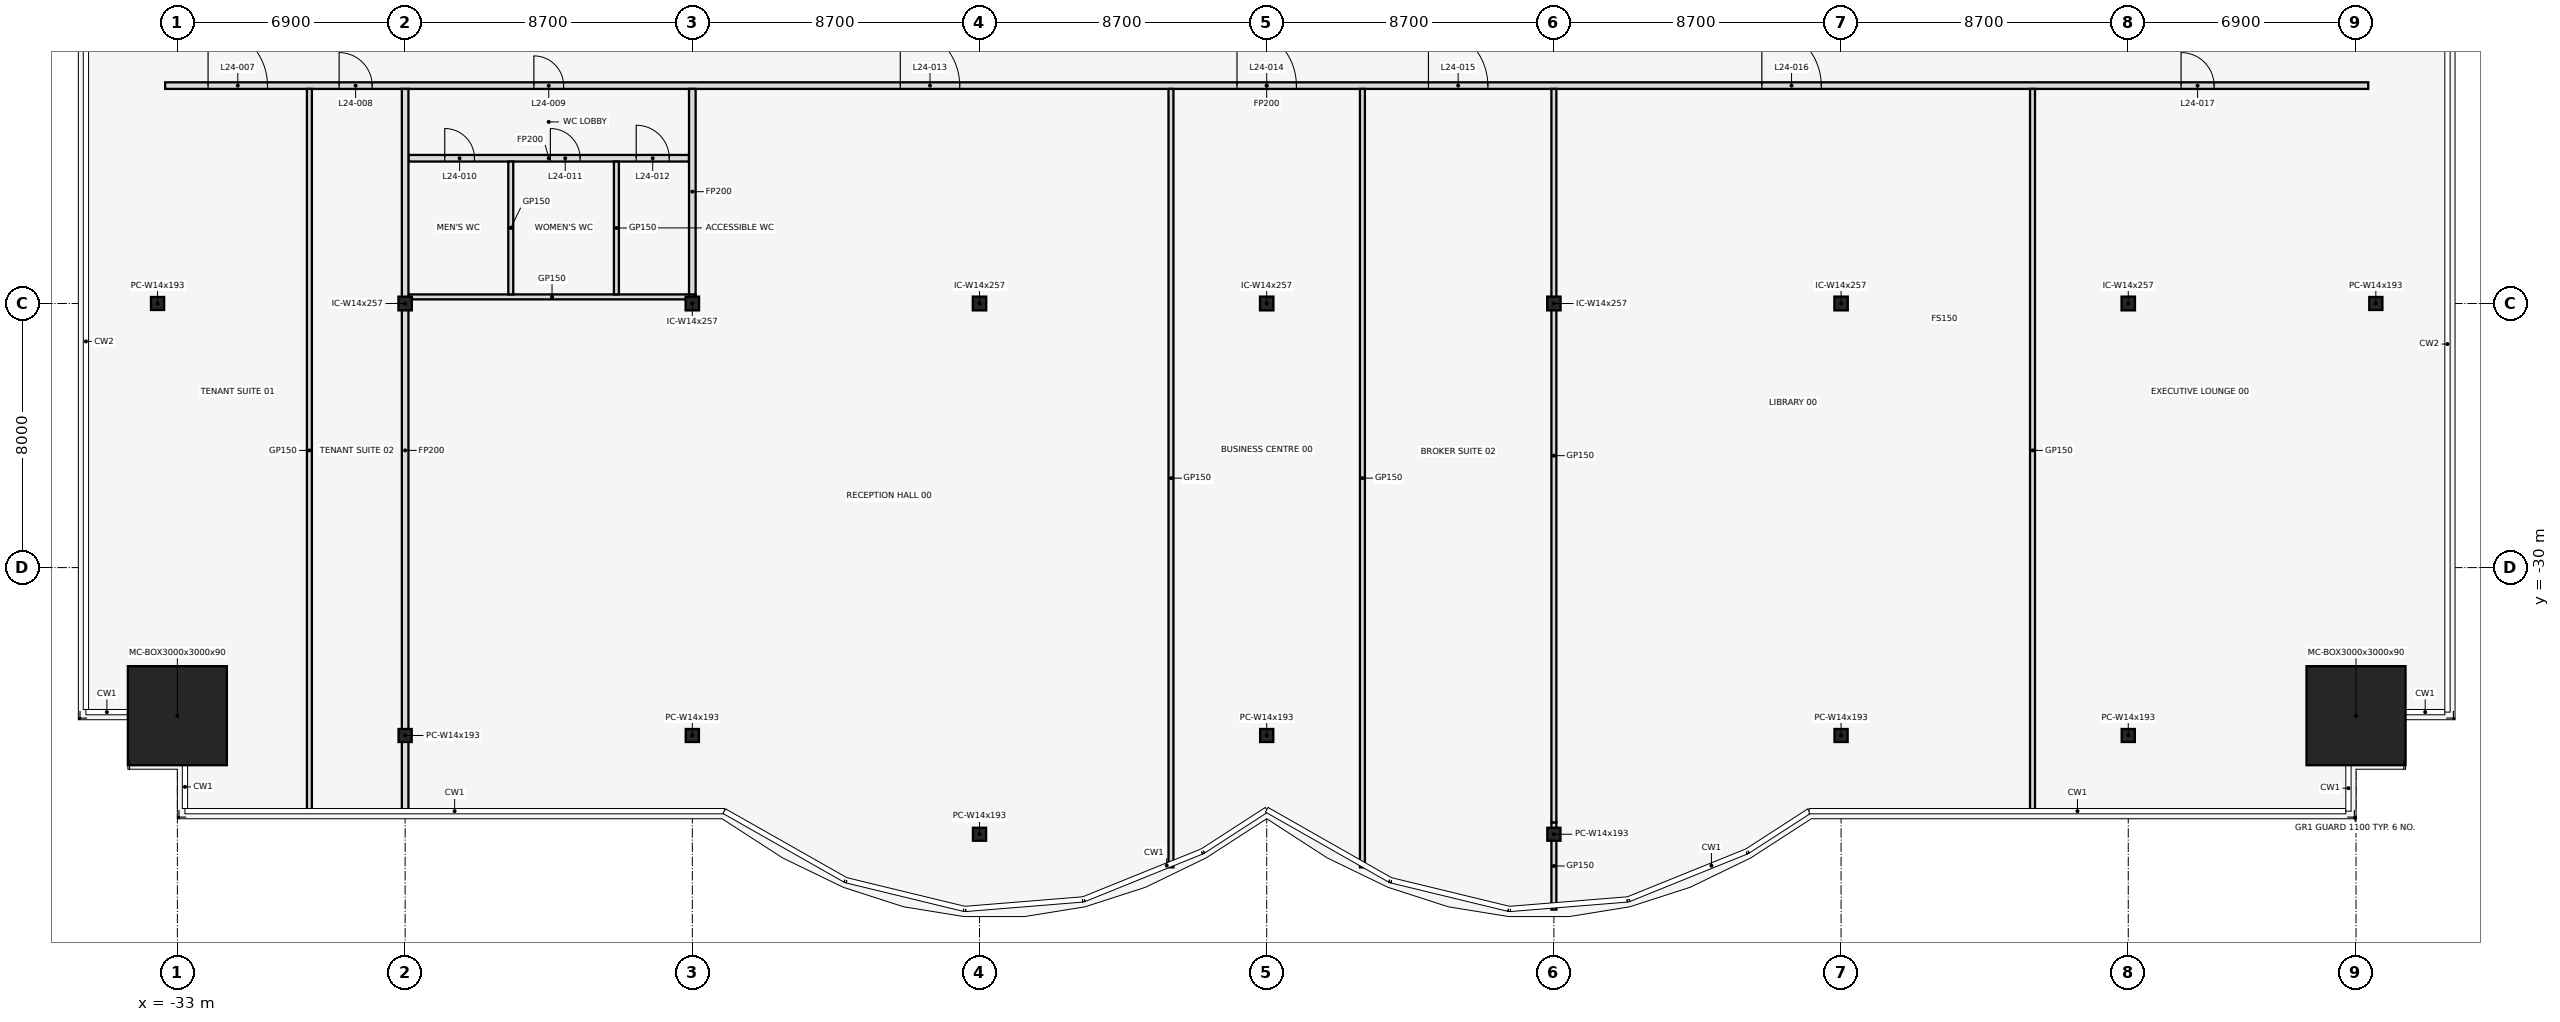
"""IFC4 building model, lengths in metres.
Left out: names, types, materials, properties, quantities, classifications, styles, units other than length and angle.
Written with IfcOpenShell. Run it as: python <this file> out.ifc"""

import sys

from ifc_helpers import new_model, si_unit, direction, frame, frame_2d, origin, origin_2d, place, context, subcontext, project, spatial, rectangle, hollow_rectangle, i_section, extrude, element, fill, save


model = new_model("IFC4")
c1 = context("Model", 3, precision=1e-05, world=origin(), true_north=direction((0.0, 1.0)))
c2 = subcontext(c1, "Body", "Model", "MODEL_VIEW")
j1 = project(units=[si_unit("LENGTHUNIT", "METRE"), si_unit("PLANEANGLEUNIT", "RADIAN")], contexts=[c1])
p1 = place(None, origin())
s1 = spatial("IfcSite", under=j1, at=p1, CompositionType="ELEMENT")
p2 = place(p1, origin())
s2 = spatial("IfcBuilding", under=s1, at=p2, CompositionType="ELEMENT")
p3 = place(p2, frame((0.0, 0.0, 114.5)))
s3 = spatial("IfcBuildingStorey", under=s2, at=p3, CompositionType="ELEMENT", Elevation=114.5)
p4 = place(p3, frame((-33.0, -34.486, 0.0), z_axis=(0.0, 0.0, 1.0), x_axis=(1.0, 0.0, 0.0)))
e1 = element("IfcColumn", 1, at=p4, inside=s3, PredefinedType="COLUMN", context=c2, shape_type="SweptSolid", body=[
    extrude(hollow_rectangle(XDim=3.0, YDim=3.0, WallThickness=0.09, at=origin_2d()), origin(), (0.0, 0.0, 1.0), 4.1),
])
for number, where, z_axis, x_axis in (
    (2, (-26.1, -35.086, 0.0), (0.0, 0.0, 1.0), (1.0, 0.0, 0.0)),
    (3, (-17.4, -35.086, 0.0), (0.0, 0.0, 1.0), (1.0, 0.0, 0.0)),
    (4, (-8.7, -38.077, 0.0), (0.0, 0.0, 1.0), (1.0, 0.0, 0.0)),
    (5, (0.0, -35.086, 0.0), (0.0, 0.0, 1.0), (1.0, 0.0, 0.0)),
    (6, (8.7, -38.077, 0.0), (0.0, 0.0, 1.0), (1.0, 0.0, 0.0)),
    (7, (17.4, -35.086, 0.0), (0.0, 0.0, 1.0), (1.0, 0.0, 0.0)),
    (8, (26.1, -35.086, 0.0), (0.0, 0.0, 1.0), (1.0, 0.0, 0.0)),
):
    element("IfcColumn", number, at=place(p3, frame(where, z_axis=z_axis, x_axis=x_axis)), inside=s3, PredefinedType="COLUMN", context=c2, shape_type="SweptSolid", body=[
        extrude(i_section(OverallWidth=0.399, OverallDepth=0.394, WebThickness=0.023, FlangeThickness=0.037, at=origin_2d()), origin(), (0.0, 0.0, 1.0), 4.1),
    ])
p5 = place(p3, frame((33.0, -34.486, 0.0), z_axis=(0.0, 0.0, 1.0), x_axis=(1.0, 0.0, 0.0)))
e9 = element("IfcColumn", 9, at=p5, inside=s3, PredefinedType="COLUMN", context=c2, shape_type="SweptSolid", body=[
    extrude(hollow_rectangle(XDim=3.0, YDim=3.0, WallThickness=0.09, at=origin_2d()), origin(), (0.0, 0.0, 1.0), 4.1),
])
for number, where, z_axis, x_axis in (
    (10, (-33.6, -22.0, 0.0), (0.0, 0.0, 1.0), (1.0, 0.0, 0.0)),
    (11, (33.6, -22.0, 0.0), (0.0, 0.0, 1.0), (1.0, 0.0, 0.0)),
):
    element("IfcColumn", number, at=place(p3, frame(where, z_axis=z_axis, x_axis=x_axis)), inside=s3, PredefinedType="COLUMN", context=c2, shape_type="SweptSolid", body=[
        extrude(i_section(OverallWidth=0.399, OverallDepth=0.394, WebThickness=0.023, FlangeThickness=0.037, at=origin_2d()), origin(), (0.0, 0.0, 1.0), 4.1),
    ])
for number, where, z_axis, x_axis in (
    (12, (-26.1, -22.0, 0.0), (0.0, 0.0, 1.0), (1.0, 0.0, 0.0)),
    (13, (-17.4, -22.0, 0.0), (0.0, 0.0, 1.0), (1.0, 0.0, 0.0)),
    (14, (-8.7, -22.0, 0.0), (0.0, 0.0, 1.0), (1.0, 0.0, 0.0)),
    (15, (0.0, -22.0, 0.0), (0.0, 0.0, 1.0), (1.0, 0.0, 0.0)),
    (16, (8.7, -22.0, 0.0), (0.0, 0.0, 1.0), (1.0, 0.0, 0.0)),
    (17, (17.4, -22.0, 0.0), (0.0, 0.0, 1.0), (1.0, 0.0, 0.0)),
    (18, (26.1, -22.0, 0.0), (0.0, 0.0, 1.0), (1.0, 0.0, 0.0)),
):
    element("IfcColumn", number, at=place(p3, frame(where, z_axis=z_axis, x_axis=x_axis)), inside=s3, PredefinedType="COLUMN", context=c2, shape_type="SweptSolid", body=[
        extrude(i_section(OverallWidth=0.406, OverallDepth=0.417, WebThickness=0.03, FlangeThickness=0.048, at=origin_2d()), origin(), (0.0, 0.0, 1.0), 4.1),
    ])
p6 = place(p3, frame((-26.0, -21.8, 0.0), z_axis=(0.0, 0.0, 1.0), x_axis=(1.0, 0.0, 0.0)))
e19 = element("IfcWall", 19, at=p6, inside=s3, PredefinedType="PARTITIONING", context=c2, shape_type="SweptSolid", body=[
    extrude(rectangle(XDim=8.7, YDim=0.15, at=frame_2d((4.35, 0.0))), origin(), (0.0, 0.0, 1.0), 3.018),
])
p7 = place(p3, frame((-26.0, -17.6, 0.0), z_axis=(0.0, 0.0, 1.0), x_axis=(1.0, 0.0, 0.0)))
e20 = element("IfcWall", 20, at=p7, inside=s3, PredefinedType="PARTITIONING", context=c2, shape_type="SweptSolid", body=[
    extrude(rectangle(XDim=8.5, YDim=0.2, at=frame_2d((4.25, 0.0))), origin(), (0.0, 0.0, 1.0), 3.018),
])
p8 = place(p7, frame((1.1, 0.0, 0.0)))
e21 = element("IfcOpeningElement", 21, at=p8, cuts=e20, PredefinedType="OPENING", context=c2, shape_type="SweptSolid", body=[
    extrude(rectangle(XDim=0.9, YDim=2.1, at=frame_2d((0.45, 1.05))), frame((0.0, 0.112, 0.0), z_axis=(0.0, -1.0, 0.0), x_axis=(1.0, 0.0, 0.0)), (0.0, 0.0, 1.0), 0.224),
])
p9 = place(p7, frame((4.3, 0.0, 0.0)))
e22 = element("IfcOpeningElement", 22, at=p9, cuts=e20, PredefinedType="OPENING", context=c2, shape_type="SweptSolid", body=[
    extrude(rectangle(XDim=0.9, YDim=2.1, at=frame_2d((0.45, 1.05))), frame((0.0, 0.112, 0.0), z_axis=(0.0, -1.0, 0.0), x_axis=(1.0, 0.0, 0.0)), (0.0, 0.0, 1.0), 0.224),
])
p10 = place(p7, frame((6.9, 0.0, 0.0)))
e23 = element("IfcOpeningElement", 23, at=p10, cuts=e20, PredefinedType="OPENING", context=c2, shape_type="SweptSolid", body=[
    extrude(rectangle(XDim=1.0, YDim=2.1, at=frame_2d((0.5, 1.05))), frame((0.0, 0.112, 0.0), z_axis=(0.0, -1.0, 0.0), x_axis=(1.0, 0.0, 0.0)), (0.0, 0.0, 1.0), 0.224),
])
p11 = place(p3, frame((-33.37, -15.4, 0.0), z_axis=(0.0, 0.0, 1.0), x_axis=(1.0, 0.0, 0.0)))
e24 = element("IfcWall", 24, at=p11, inside=s3, PredefinedType="PARTITIONING", context=c2, shape_type="SweptSolid", body=[
    extrude(rectangle(XDim=66.74, YDim=0.2, at=frame_2d((33.37, 0.0))), origin(), (0.0, 0.0, 1.0), 3.018),
])
p12 = place(p11, frame((1.3, 0.0, 0.0)))
e25 = element("IfcOpeningElement", 25, at=p12, cuts=e24, PredefinedType="OPENING", context=c2, shape_type="SweptSolid", body=[
    extrude(rectangle(XDim=1.8, YDim=2.1, at=frame_2d((0.9, 1.05))), frame((0.0, 0.112, 0.0), z_axis=(0.0, -1.0, 0.0), x_axis=(1.0, 0.0, 0.0)), (0.0, 0.0, 1.0), 0.224),
])
p13 = place(p11, frame((5.27, 0.0, 0.0)))
e26 = element("IfcOpeningElement", 26, at=p13, cuts=e24, PredefinedType="OPENING", context=c2, shape_type="SweptSolid", body=[
    extrude(rectangle(XDim=1.0, YDim=2.1, at=frame_2d((0.5, 1.05))), frame((0.0, 0.112, 0.0), z_axis=(0.0, -1.0, 0.0), x_axis=(1.0, 0.0, 0.0)), (0.0, 0.0, 1.0), 0.224),
])
p14 = place(p11, frame((11.17, 0.0, 0.0)))
e27 = element("IfcOpeningElement", 27, at=p14, cuts=e24, PredefinedType="OPENING", context=c2, shape_type="SweptSolid", body=[
    extrude(rectangle(XDim=0.9, YDim=2.1, at=frame_2d((0.45, 1.05))), frame((0.0, 0.112, 0.0), z_axis=(0.0, -1.0, 0.0), x_axis=(1.0, 0.0, 0.0)), (0.0, 0.0, 1.0), 0.224),
])
p15 = place(p11, frame((22.27, 0.0, 0.0)))
e28 = element("IfcOpeningElement", 28, at=p15, cuts=e24, PredefinedType="OPENING", context=c2, shape_type="SweptSolid", body=[
    extrude(rectangle(XDim=1.8, YDim=2.1, at=frame_2d((0.9, 1.05))), frame((0.0, 0.112, 0.0), z_axis=(0.0, -1.0, 0.0), x_axis=(1.0, 0.0, 0.0)), (0.0, 0.0, 1.0), 0.224),
])
p16 = place(p11, frame((32.47, 0.0, 0.0)))
e29 = element("IfcOpeningElement", 29, at=p16, cuts=e24, PredefinedType="OPENING", context=c2, shape_type="SweptSolid", body=[
    extrude(rectangle(XDim=1.8, YDim=2.1, at=frame_2d((0.9, 1.05))), frame((0.0, 0.112, 0.0), z_axis=(0.0, -1.0, 0.0), x_axis=(1.0, 0.0, 0.0)), (0.0, 0.0, 1.0), 0.224),
])
p17 = place(p11, frame((38.27, 0.0, 0.0)))
e30 = element("IfcOpeningElement", 30, at=p17, cuts=e24, PredefinedType="OPENING", context=c2, shape_type="SweptSolid", body=[
    extrude(rectangle(XDim=1.8, YDim=2.1, at=frame_2d((0.9, 1.05))), frame((0.0, 0.112, 0.0), z_axis=(0.0, -1.0, 0.0), x_axis=(1.0, 0.0, 0.0)), (0.0, 0.0, 1.0), 0.224),
])
p18 = place(p11, frame((48.37, 0.0, 0.0)))
e31 = element("IfcOpeningElement", 31, at=p18, cuts=e24, PredefinedType="OPENING", context=c2, shape_type="SweptSolid", body=[
    extrude(rectangle(XDim=1.8, YDim=2.1, at=frame_2d((0.9, 1.05))), frame((0.0, 0.112, 0.0), z_axis=(0.0, -1.0, 0.0), x_axis=(1.0, 0.0, 0.0)), (0.0, 0.0, 1.0), 0.224),
])
p19 = place(p11, frame((61.07, 0.0, 0.0)))
e32 = element("IfcOpeningElement", 32, at=p19, cuts=e24, PredefinedType="OPENING", context=c2, shape_type="SweptSolid", body=[
    extrude(rectangle(XDim=1.0, YDim=2.1, at=frame_2d((0.5, 1.05))), frame((0.0, 0.112, 0.0), z_axis=(0.0, -1.0, 0.0), x_axis=(1.0, 0.0, 0.0)), (0.0, 0.0, 1.0), 0.224),
])
p20 = place(p3, frame((-29.0, -37.4, 0.0), z_axis=(0.0, 0.0, 1.0), x_axis=(0.0, 1.0, 0.0)))
e33 = element("IfcWall", 33, at=p20, inside=s3, PredefinedType="PARTITIONING", context=c2, shape_type="SweptSolid", body=[
    extrude(rectangle(XDim=21.9, YDim=0.15, at=frame_2d((10.95, 0.0))), origin(), (0.0, 0.0, 1.0), 3.018),
])
p21 = place(p3, frame((-26.1, -37.4, 0.0), z_axis=(0.0, 0.0, 1.0), x_axis=(0.0, 1.0, 0.0)))
e34 = element("IfcWall", 34, at=p21, inside=s3, PredefinedType="PARTITIONING", context=c2, shape_type="SweptSolid", body=[
    extrude(rectangle(XDim=21.9, YDim=0.2, at=frame_2d((10.95, 0.0))), origin(), (0.0, 0.0, 1.0), 3.018),
])
for number, where, z_axis, x_axis in (
    (35, (-22.9, -21.725, 0.0), (0.0, 0.0, 1.0), (0.0, 1.0, 0.0)),
    (36, (-19.7, -21.725, 0.0), (0.0, 0.0, 1.0), (0.0, 1.0, 0.0)),
):
    element("IfcWall", number, at=place(p3, frame(where, z_axis=z_axis, x_axis=x_axis)), inside=s3, PredefinedType="PARTITIONING", context=c2, shape_type="SweptSolid", body=[
        extrude(rectangle(XDim=4.025, YDim=0.15, at=frame_2d((2.013, 0.0))), origin(), (0.0, 0.0, 1.0), 3.018),
    ])
p22 = place(p3, frame((-17.4, -21.725, 0.0), z_axis=(0.0, 0.0, 1.0), x_axis=(0.0, 1.0, 0.0)))
e37 = element("IfcWall", 37, at=p22, inside=s3, PredefinedType="PARTITIONING", context=c2, shape_type="SweptSolid", body=[
    extrude(rectangle(XDim=6.225, YDim=0.2, at=frame_2d((3.113, 0.0))), origin(), (0.0, 0.0, 1.0), 3.018),
])
for number, where, z_axis, x_axis in (
    (38, (-2.9, -39.08, 0.0), (0.0, 0.0, 1.0), (0.0, 1.0, 0.0)),
    (39, (2.9, -39.08, 0.0), (0.0, 0.0, 1.0), (0.0, 1.0, 0.0)),
):
    element("IfcWall", number, at=place(p3, frame(where, z_axis=z_axis, x_axis=x_axis)), inside=s3, PredefinedType="PARTITIONING", context=c2, shape_type="SweptSolid", body=[
        extrude(rectangle(XDim=23.58, YDim=0.15, at=frame_2d((11.79, 0.0))), origin(), (0.0, 0.0, 1.0), 3.018),
    ])
p23 = place(p3, frame((8.7, -40.36, 0.0), z_axis=(0.0, 0.0, 1.0), x_axis=(0.0, 1.0, 0.0)))
e40 = element("IfcWall", 40, at=p23, inside=s3, PredefinedType="PARTITIONING", context=c2, shape_type="SweptSolid", body=[
    extrude(rectangle(XDim=2.642, YDim=0.15, at=frame_2d((1.321, 0.0))), origin(), (0.0, 0.0, 1.0), 3.018),
])
p24 = place(p3, frame((8.7, -37.718, 0.0), z_axis=(0.0, 0.0, 1.0), x_axis=(0.0, 1.0, 0.0)))
e41 = element("IfcWall", 41, at=p24, inside=s3, PredefinedType="PARTITIONING", context=c2, shape_type="SweptSolid", body=[
    extrude(rectangle(XDim=22.218, YDim=0.15, at=frame_2d((11.109, 0.0))), origin(), (0.0, 0.0, 1.0), 3.018),
])
p25 = place(p3, frame((23.2, -37.4, 0.0), z_axis=(0.0, 0.0, 1.0), x_axis=(0.0, 1.0, 0.0)))
e42 = element("IfcWall", 42, at=p25, inside=s3, PredefinedType="PARTITIONING", context=c2, shape_type="SweptSolid", body=[
    extrude(rectangle(XDim=21.9, YDim=0.15, at=frame_2d((10.95, 0.0))), origin(), (0.0, 0.0, 1.0), 3.018),
])
p26 = place(p12, origin())
e43 = element("IfcDoor", 43, at=p26, inside=s3, OperationType="SINGLE_SWING_LEFT", PredefinedType="DOOR", context=c2, shape_type="SweptSolid", body=[
    extrude(rectangle(XDim=1.8, YDim=2.1, at=frame_2d((0.9, 1.05))), frame((0.0, 0.025, 0.0), z_axis=(0.0, -1.0, 0.0), x_axis=(1.0, 0.0, 0.0)), (0.0, 0.0, 1.0), 0.05),
])
fill(e25, e43)
p27 = place(p13, frame((1.0, 0.0, 0.0), z_axis=(0.0, 0.0, 1.0), x_axis=(-1.0, 0.0, 0.0)))
e44 = element("IfcDoor", 44, at=p27, inside=s3, OperationType="SINGLE_SWING_RIGHT", PredefinedType="DOOR", context=c2, shape_type="SweptSolid", body=[
    extrude(rectangle(XDim=1.0, YDim=2.1, at=frame_2d((0.5, 1.05))), frame((0.0, 0.025, 0.0), z_axis=(0.0, -1.0, 0.0), x_axis=(1.0, 0.0, 0.0)), (0.0, 0.0, 1.0), 0.05),
])
fill(e26, e44)
p28 = place(p14, frame((0.9, 0.0, 0.0), z_axis=(0.0, 0.0, 1.0), x_axis=(-1.0, 0.0, 0.0)))
e45 = element("IfcDoor", 45, at=p28, inside=s3, OperationType="SINGLE_SWING_RIGHT", PredefinedType="DOOR", context=c2, shape_type="SweptSolid", body=[
    extrude(rectangle(XDim=0.9, YDim=2.1, at=frame_2d((0.45, 1.05))), frame((0.0, 0.025, 0.0), z_axis=(0.0, -1.0, 0.0), x_axis=(1.0, 0.0, 0.0)), (0.0, 0.0, 1.0), 0.05),
])
fill(e27, e45)
p29 = place(p8, frame((0.9, 0.0, 0.0), z_axis=(0.0, 0.0, 1.0), x_axis=(-1.0, 0.0, 0.0)))
e46 = element("IfcDoor", 46, at=p29, inside=s3, OperationType="SINGLE_SWING_LEFT", PredefinedType="DOOR", context=c2, shape_type="SweptSolid", body=[
    extrude(rectangle(XDim=0.9, YDim=2.1, at=frame_2d((0.45, 1.05))), frame((0.0, 0.025, 0.0), z_axis=(0.0, -1.0, 0.0), x_axis=(1.0, 0.0, 0.0)), (0.0, 0.0, 1.0), 0.05),
])
fill(e21, e46)
p30 = place(p9, frame((0.9, 0.0, 0.0), z_axis=(0.0, 0.0, 1.0), x_axis=(-1.0, 0.0, 0.0)))
e47 = element("IfcDoor", 47, at=p30, inside=s3, OperationType="SINGLE_SWING_RIGHT", PredefinedType="DOOR", context=c2, shape_type="SweptSolid", body=[
    extrude(rectangle(XDim=0.9, YDim=2.1, at=frame_2d((0.45, 1.05))), frame((0.0, 0.025, 0.0), z_axis=(0.0, -1.0, 0.0), x_axis=(1.0, 0.0, 0.0)), (0.0, 0.0, 1.0), 0.05),
])
fill(e22, e47)
p31 = place(p10, frame((1.0, 0.0, 0.0), z_axis=(0.0, 0.0, 1.0), x_axis=(-1.0, 0.0, 0.0)))
e48 = element("IfcDoor", 48, at=p31, inside=s3, OperationType="SINGLE_SWING_RIGHT", PredefinedType="DOOR", context=c2, shape_type="SweptSolid", body=[
    extrude(rectangle(XDim=1.0, YDim=2.1, at=frame_2d((0.5, 1.05))), frame((0.0, 0.025, 0.0), z_axis=(0.0, -1.0, 0.0), x_axis=(1.0, 0.0, 0.0)), (0.0, 0.0, 1.0), 0.05),
])
fill(e23, e48)
p32 = place(p15, origin())
e49 = element("IfcDoor", 49, at=p32, inside=s3, OperationType="SINGLE_SWING_LEFT", PredefinedType="DOOR", context=c2, shape_type="SweptSolid", body=[
    extrude(rectangle(XDim=1.8, YDim=2.1, at=frame_2d((0.9, 1.05))), frame((0.0, 0.025, 0.0), z_axis=(0.0, -1.0, 0.0), x_axis=(1.0, 0.0, 0.0)), (0.0, 0.0, 1.0), 0.05),
])
fill(e28, e49)
p33 = place(p16, origin())
e50 = element("IfcDoor", 50, at=p33, inside=s3, OperationType="SINGLE_SWING_LEFT", PredefinedType="DOOR", context=c2, shape_type="SweptSolid", body=[
    extrude(rectangle(XDim=1.8, YDim=2.1, at=frame_2d((0.9, 1.05))), frame((0.0, 0.025, 0.0), z_axis=(0.0, -1.0, 0.0), x_axis=(1.0, 0.0, 0.0)), (0.0, 0.0, 1.0), 0.05),
])
fill(e29, e50)
p34 = place(p17, origin())
e51 = element("IfcDoor", 51, at=p34, inside=s3, OperationType="SINGLE_SWING_LEFT", PredefinedType="DOOR", context=c2, shape_type="SweptSolid", body=[
    extrude(rectangle(XDim=1.8, YDim=2.1, at=frame_2d((0.9, 1.05))), frame((0.0, 0.025, 0.0), z_axis=(0.0, -1.0, 0.0), x_axis=(1.0, 0.0, 0.0)), (0.0, 0.0, 1.0), 0.05),
])
fill(e30, e51)
p35 = place(p18, origin())
e52 = element("IfcDoor", 52, at=p35, inside=s3, OperationType="SINGLE_SWING_LEFT", PredefinedType="DOOR", context=c2, shape_type="SweptSolid", body=[
    extrude(rectangle(XDim=1.8, YDim=2.1, at=frame_2d((0.9, 1.05))), frame((0.0, 0.025, 0.0), z_axis=(0.0, -1.0, 0.0), x_axis=(1.0, 0.0, 0.0)), (0.0, 0.0, 1.0), 0.05),
])
fill(e31, e52)
p36 = place(p19, frame((1.0, 0.0, 0.0), z_axis=(0.0, 0.0, 1.0), x_axis=(-1.0, 0.0, 0.0)))
e53 = element("IfcDoor", 53, at=p36, inside=s3, OperationType="SINGLE_SWING_RIGHT", PredefinedType="DOOR", context=c2, shape_type="SweptSolid", body=[
    extrude(rectangle(XDim=1.0, YDim=2.1, at=frame_2d((0.5, 1.05))), frame((0.0, 0.025, 0.0), z_axis=(0.0, -1.0, 0.0), x_axis=(1.0, 0.0, 0.0)), (0.0, 0.0, 1.0), 0.05),
])
fill(e32, e53)
save(model, sys.argv[1])
